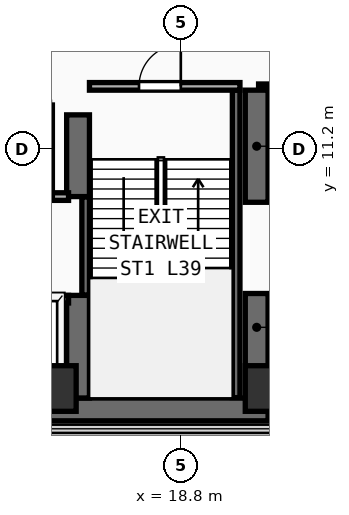
"""IFC4 building model, lengths in metres.
Left out: names, types, materials, properties, quantities, classifications, styles, units other than length and angle.
Written with IfcOpenShell. Run it as: python <this file> out.ifc"""

import sys

from ifc_helpers import new_model, si_unit, direction, frame, frame_2d, origin, origin_2d, place, context, subcontext, project, spatial, rectangle, extrude, element, fill, save


model = new_model("IFC4")
c1 = context("Model", 3, precision=1e-05, world=origin(), true_north=direction((0.0, 1.0)))
c2 = subcontext(c1, "Body", "Model", "MODEL_VIEW")
j1 = project(units=[si_unit("LENGTHUNIT", "METRE"), si_unit("PLANEANGLEUNIT", "RADIAN")], contexts=[c1])
p1 = place(None, origin())
s1 = spatial("IfcSite", under=j1, at=p1, CompositionType="ELEMENT")
p2 = place(p1, origin())
s2 = spatial("IfcBuilding", under=s1, at=p2, CompositionType="ELEMENT")
p3 = place(p2, frame((0.0, 0.0, 153.8)))
s3 = spatial("IfcBuildingStorey", under=s2, at=p3, CompositionType="ELEMENT", Elevation=153.8)
p4 = place(p3, frame((7.15, 4.35, 0.0), z_axis=(0.0, 0.0, 1.0), x_axis=(1.0, 0.0, 0.0)))
e1 = element("IfcWall", 1, at=p4, inside=s3, PredefinedType="SHEAR", context=c2, shape_type="SweptSolid", body=[
    extrude(rectangle(XDim=13.95, YDim=0.6, at=frame_2d((6.975, 0.0))), origin(), (0.0, 0.0, 1.0), 3.56),
])
p5 = place(p3, frame((20.8, 4.65, 0.0), z_axis=(0.0, 0.0, 1.0), x_axis=(0.0, 1.0, 0.0)))
e2 = element("IfcWall", 2, at=p5, inside=s3, PredefinedType="SHEAR", context=c2, shape_type="SweptSolid", body=[
    extrude(rectangle(XDim=2.75, YDim=0.6, at=frame_2d((1.375, 0.0))), origin(), (0.0, 0.0, 1.0), 3.56),
])
p6 = place(p3, frame((20.8, 9.8, 0.0), z_axis=(0.0, 0.0, 1.0), x_axis=(0.0, 1.0, 0.0)))
e3 = element("IfcWall", 3, at=p6, inside=s3, PredefinedType="SHEAR", context=c2, shape_type="SweptSolid", body=[
    extrude(rectangle(XDim=2.95, YDim=0.6, at=frame_2d((1.475, 0.0))), origin(), (0.0, 0.0, 1.0), 3.56),
])
p7 = place(p3, frame((16.1, 4.65, 0.0), z_axis=(0.0, 0.0, 1.0), x_axis=(0.0, 1.0, 0.0)))
e4 = element("IfcWall", 4, at=p7, inside=s3, PredefinedType="SHEAR", context=c2, shape_type="SweptSolid", body=[
    extrude(rectangle(XDim=2.7, YDim=0.6, at=frame_2d((1.35, 0.0))), origin(), (0.0, 0.0, 1.0), 3.56),
])
p8 = place(p3, frame((16.1, 9.95, 0.0), z_axis=(0.0, 0.0, 1.0), x_axis=(0.0, 1.0, 0.0)))
e5 = element("IfcWall", 5, at=p8, inside=s3, PredefinedType="SHEAR", context=c2, shape_type="SweptSolid", body=[
    extrude(rectangle(XDim=2.15, YDim=0.6, at=frame_2d((1.075, 0.0))), origin(), (0.0, 0.0, 1.0), 3.56),
])
for number, where, z_axis, x_axis in (
    (6, (15.45, 4.9, 0.0), (0.0, 0.0, 1.0), (1.0, 0.0, 0.0)),
    (7, (21.1, 4.9, 0.0), (0.0, 0.0, 1.0), (1.0, 0.0, 0.0)),
):
    element("IfcColumn", number, at=place(p3, frame(where, z_axis=z_axis, x_axis=x_axis)), inside=s3, PredefinedType="COLUMN", context=c2, shape_type="SweptSolid", body=[
        extrude(rectangle(XDim=1.2, YDim=1.2, at=origin_2d()), origin(), (0.0, 0.0, 1.0), 3.56),
    ])
p9 = place(p3, frame((16.3, 7.36, 0.0), z_axis=(0.0, 0.0, 1.0), x_axis=(0.0, 1.0, 0.0)))
e8 = element("IfcWall", 8, at=p9, inside=s3, PredefinedType="SHEAR", context=c2, shape_type="SweptSolid", body=[
    extrude(rectangle(XDim=2.58, YDim=0.2, at=frame_2d((1.29, 0.0))), origin(), (0.0, 0.0, 1.0), 3.56),
])
p10 = place(p3, frame((20.26, 4.66, 0.0), z_axis=(0.0, 0.0, 1.0), x_axis=(0.0, 1.0, 0.0)))
e9 = element("IfcWall", 9, at=p10, inside=s3, PredefinedType="SHEAR", context=c2, shape_type="SweptSolid", body=[
    extrude(rectangle(XDim=8.09, YDim=0.2, at=frame_2d((4.045, 0.0))), origin(), (0.0, 0.0, 1.0), 3.56),
])
p11 = place(p3, frame((16.4, 12.85, 0.0), z_axis=(0.0, 0.0, 1.0), x_axis=(1.0, 0.0, 0.0)))
e10 = element("IfcWall", 10, at=p11, inside=s3, PredefinedType="PARTITIONING", context=c2, shape_type="SweptSolid", body=[
    extrude(rectangle(XDim=3.96, YDim=0.2, at=frame_2d((1.98, 0.0))), origin(), (0.0, 0.0, 1.0), 3.56),
])
p12 = place(p11, frame((1.304, 0.0, 0.0)))
e11 = element("IfcOpeningElement", 11, at=p12, cuts=e10, PredefinedType="OPENING", context=c2, shape_type="SweptSolid", body=[
    extrude(rectangle(XDim=1.1, YDim=2.2, at=frame_2d((0.55, 1.1))), frame((0.0, 0.11, 0.0), z_axis=(0.0, -1.0, 0.0), x_axis=(1.0, 0.0, 0.0)), (0.0, 0.0, 1.0), 0.22),
])
p13 = place(p3, frame((7.5, 7.25, 0.0), z_axis=(0.0, 0.0, 1.0), x_axis=(1.0, 0.0, 0.0)))
e12 = element("IfcWall", 12, at=p13, inside=s3, PredefinedType="PARTITIONING", context=c2, shape_type="SweptSolid", body=[
    extrude(rectangle(XDim=8.35, YDim=0.2, at=frame_2d((4.175, 0.0))), origin(), (0.0, 0.0, 1.0), 3.56),
])
p14 = place(p13, frame((0.53, 0.0, 0.0)))
e13 = element("IfcOpeningElement", 13, at=p14, cuts=e12, PredefinedType="OPENING", context=c2, shape_type="SweptSolid", body=[
    extrude(rectangle(XDim=1.1, YDim=2.2, at=frame_2d((0.55, 1.1))), frame((0.0, 0.11, 0.0), z_axis=(0.0, -1.0, 0.0), x_axis=(1.0, 0.0, 0.0)), (0.0, 0.0, 1.0), 0.22),
])
p15 = place(p13, frame((2.37, 0.0, 0.0)))
e14 = element("IfcOpeningElement", 14, at=p15, cuts=e12, PredefinedType="OPENING", context=c2, shape_type="SweptSolid", body=[
    extrude(rectangle(XDim=1.1, YDim=2.2, at=frame_2d((0.55, 1.1))), frame((0.0, 0.11, 0.0), z_axis=(0.0, -1.0, 0.0), x_axis=(1.0, 0.0, 0.0)), (0.0, 0.0, 1.0), 0.22),
])
p16 = place(p13, frame((4.33, 0.0, 0.0)))
e15 = element("IfcOpeningElement", 15, at=p16, cuts=e12, PredefinedType="OPENING", context=c2, shape_type="SweptSolid", body=[
    extrude(rectangle(XDim=1.1, YDim=2.2, at=frame_2d((0.55, 1.1))), frame((0.0, 0.11, 0.0), z_axis=(0.0, -1.0, 0.0), x_axis=(1.0, 0.0, 0.0)), (0.0, 0.0, 1.0), 0.22),
])
p17 = place(p13, frame((6.5, 0.0, 0.0)))
e16 = element("IfcOpeningElement", 16, at=p17, cuts=e12, PredefinedType="OPENING", context=c2, shape_type="SweptSolid", body=[
    extrude(rectangle(XDim=1.1, YDim=2.2, at=frame_2d((0.55, 1.1))), frame((0.0, 0.11, 0.0), z_axis=(0.0, -1.0, 0.0), x_axis=(1.0, 0.0, 0.0)), (0.0, 0.0, 1.0), 0.22),
])
p18 = place(p3, frame((7.5, 9.95, 0.0), z_axis=(0.0, 0.0, 1.0), x_axis=(1.0, 0.0, 0.0)))
e17 = element("IfcWall", 17, at=p18, inside=s3, PredefinedType="PARTITIONING", context=c2, shape_type="SweptSolid", body=[
    extrude(rectangle(XDim=8.35, YDim=0.2, at=frame_2d((4.175, 0.0))), origin(), (0.0, 0.0, 1.0), 3.56),
])
p19 = place(p3, frame((15.35, 9.95, 0.0), z_axis=(0.0, 0.0, 1.0), x_axis=(0.0, 1.0, 0.0)))
e18 = element("IfcWall", 18, at=p19, inside=s3, PredefinedType="PARTITIONING", context=c2, shape_type="SweptSolid", body=[
    extrude(rectangle(XDim=2.41, YDim=0.15, at=frame_2d((1.205, 0.0))), origin(), (0.0, 0.0, 1.0), 3.56),
])
p20 = place(p3, frame((20.85, 12.85, 0.0), z_axis=(0.0, 0.0, 1.0), x_axis=(1.0, 0.0, 0.0)))
e19 = element("IfcWall", 19, at=p20, inside=s3, PredefinedType="PARTITIONING", context=c2, shape_type="SweptSolid", body=[
    extrude(rectangle(XDim=7.05, YDim=0.125, at=frame_2d((3.525, 0.0))), origin(), (0.0, 0.0, 1.0), 3.56),
])
p21 = place(p20, frame((2.8, 0.0, 0.0)))
e20 = element("IfcOpeningElement", 20, at=p21, cuts=e19, PredefinedType="OPENING", context=c2, shape_type="SweptSolid", body=[
    extrude(rectangle(XDim=0.95, YDim=2.15, at=frame_2d((0.475, 1.075))), frame((0.0, 0.073, 0.0), z_axis=(0.0, -1.0, 0.0), x_axis=(1.0, 0.0, 0.0)), (0.0, 0.0, 1.0), 0.145),
])
p22 = place(p12, frame((1.1, 0.0, 0.0), z_axis=(0.0, 0.0, 1.0), x_axis=(-1.0, 0.0, 0.0)))
e21 = element("IfcDoor", 21, at=p22, inside=s3, OperationType="SINGLE_SWING_LEFT", PredefinedType="DOOR", context=c2, shape_type="SweptSolid", body=[
    extrude(rectangle(XDim=1.1, YDim=2.2, at=frame_2d((0.55, 1.1))), frame((0.0, 0.025, 0.0), z_axis=(0.0, -1.0, 0.0), x_axis=(1.0, 0.0, 0.0)), (0.0, 0.0, 1.0), 0.05),
])
fill(e11, e21)
save(model, sys.argv[1])
